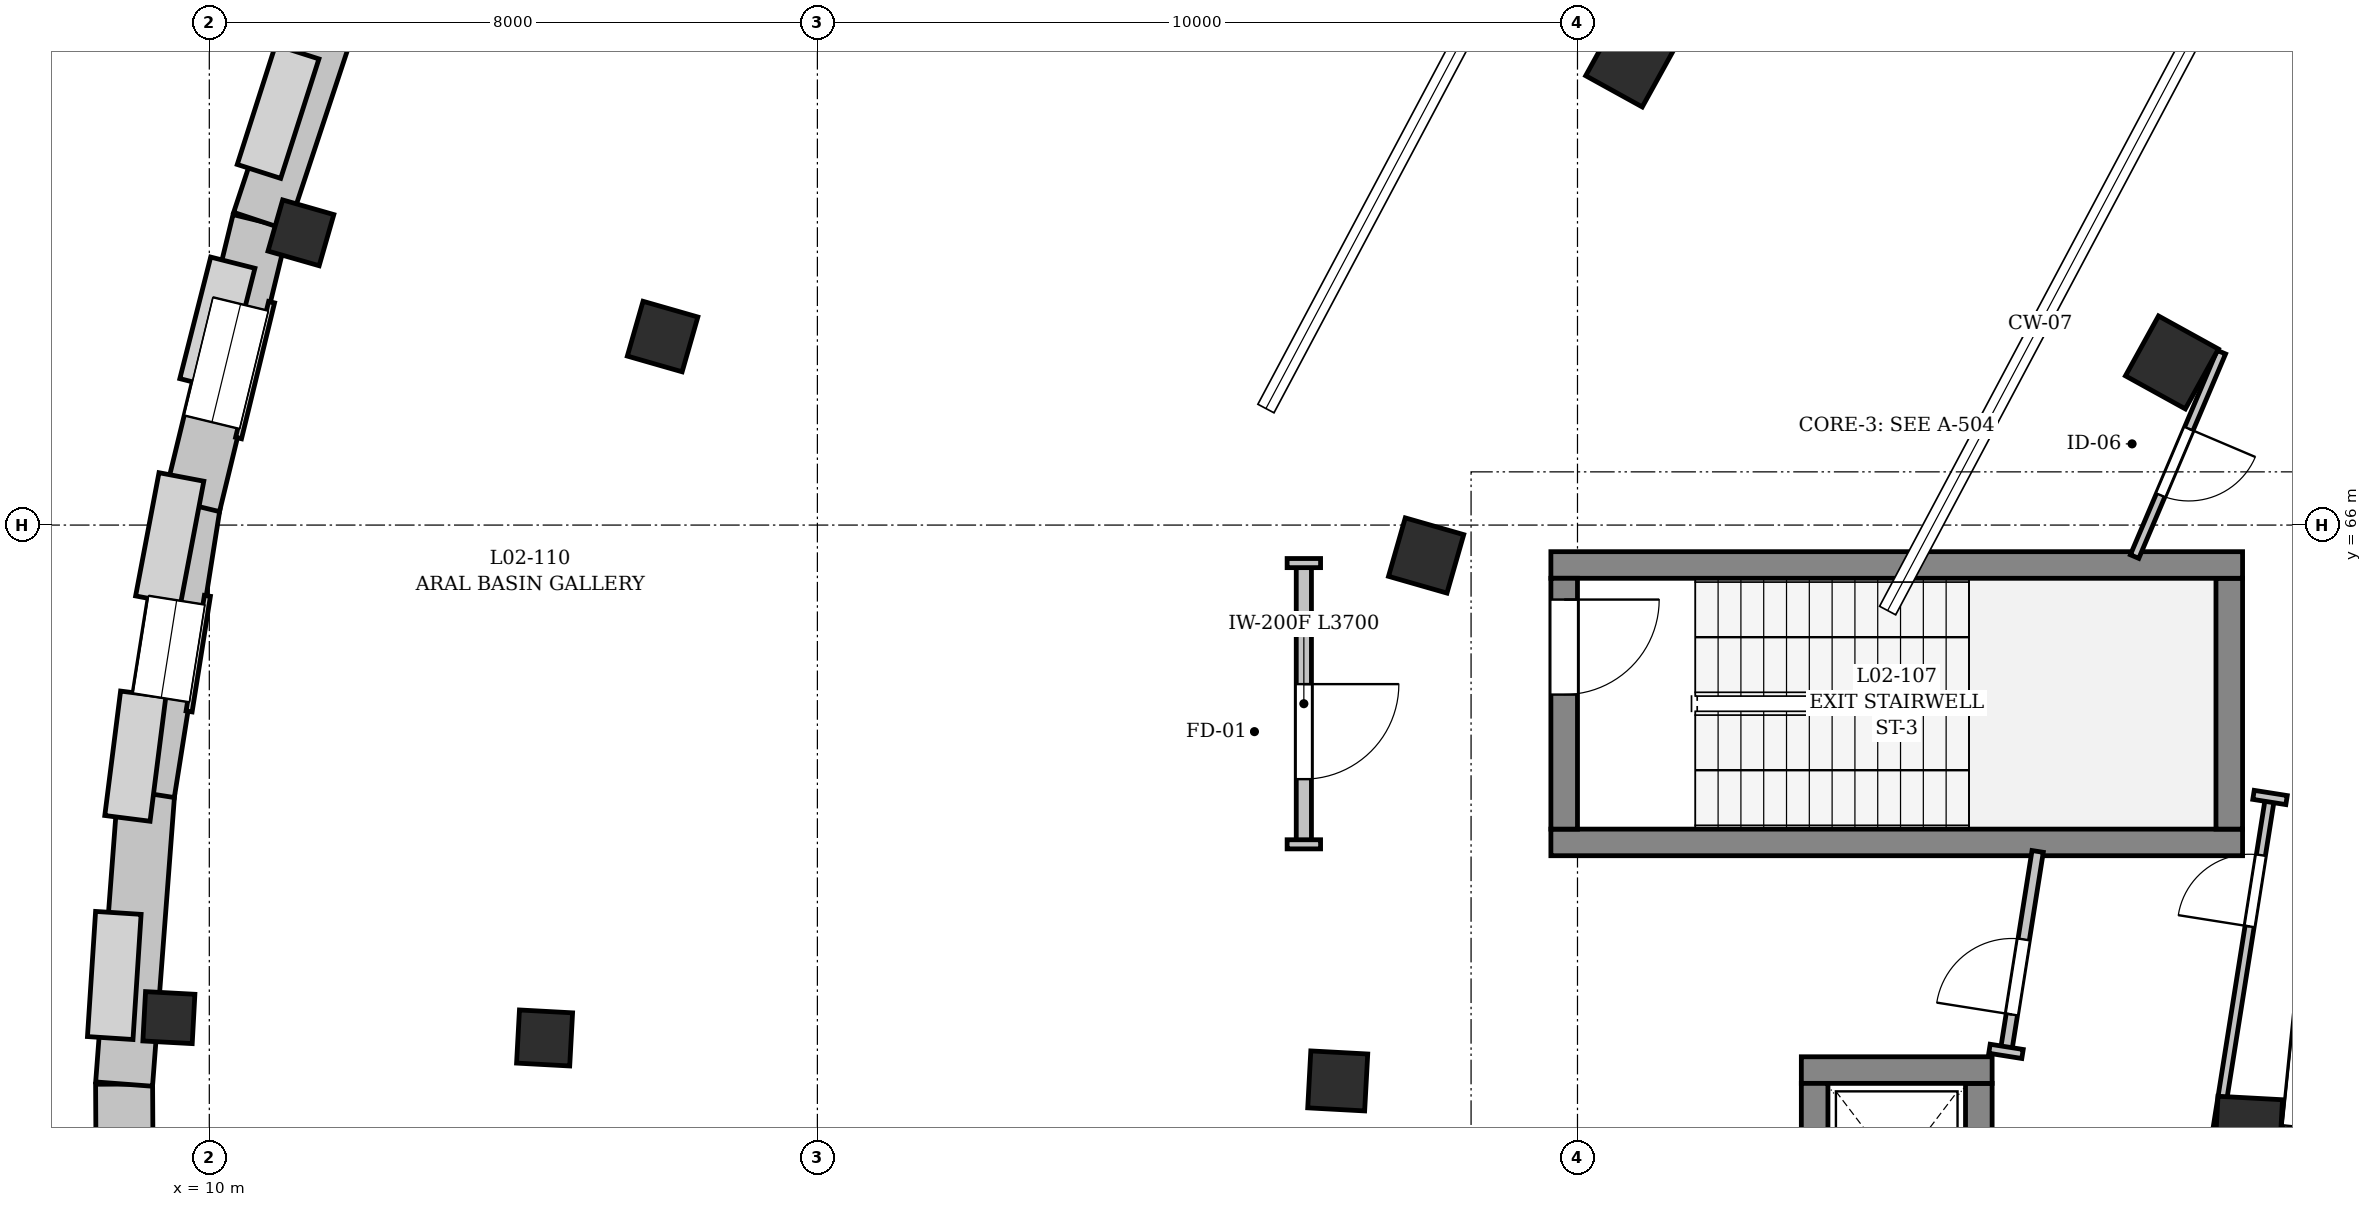
"""IFC4 building model, lengths in metres.
Left out: names, types, materials, properties, quantities, classifications, styles, units other than length and angle.
Written with IfcOpenShell. Run it as: python <this file> out.ifc"""

import sys

from ifc_helpers import new_model, si_unit, direction, frame, frame_2d, origin, origin_2d, place, context, subcontext, project, spatial, rectangle, extrude, element, fill, save


model = new_model("IFC4")
c1 = context("Model", 3, precision=1e-05, world=origin(), true_north=direction((0.0, 1.0)))
c2 = subcontext(c1, "Body", "Model", "MODEL_VIEW")
j1 = project(units=[si_unit("LENGTHUNIT", "METRE"), si_unit("PLANEANGLEUNIT", "RADIAN")], contexts=[c1])
p1 = place(None, origin())
s1 = spatial("IfcSite", under=j1, at=p1, CompositionType="ELEMENT")
p2 = place(p1, origin())
s2 = spatial("IfcBuilding", under=s1, at=p2, CompositionType="ELEMENT")
p3 = place(p2, frame((0.0, 0.0, 5.4)))
s3 = spatial("IfcBuildingStorey", under=s2, at=p3, CompositionType="ELEMENT", Elevation=5.4)
p4 = place(p3, frame((35.821, 68.14, 0.0), z_axis=(0.0, 0.0, 1.0), x_axis=(-0.875464527, 0.483282383255, 0.0)))
e1 = element("IfcColumn", 1, at=p4, inside=s3, PredefinedType="COLUMN", context=c2, shape_type="SweptSolid", body=[
    extrude(rectangle(XDim=0.9, YDim=0.9, at=origin_2d()), origin(), (0.0, 0.0, 1.0), 4.52),
])
p5 = place(p3, frame((28.686, 72.078, 0.0), z_axis=(0.0, 0.0, 1.0), x_axis=(-0.875464527, 0.483282383255, 0.0)))
e2 = element("IfcColumn", 2, at=p5, inside=s3, PredefinedType="COLUMN", context=c2, shape_type="SweptSolid", body=[
    extrude(rectangle(XDim=0.85, YDim=0.85, at=origin_2d()), origin(), (0.0, 0.0, 1.0), 4.52),
])
p6 = place(p3, frame((26.009, 65.6, 0.0), z_axis=(0.0, 0.0, 1.0), x_axis=(-0.961261695938, 0.275637355817, 0.0)))
e3 = element("IfcColumn", 3, at=p6, inside=s3, PredefinedType="COLUMN", context=c2, shape_type="SweptSolid", body=[
    extrude(rectangle(XDim=0.8, YDim=0.8, at=origin_2d()), origin(), (0.0, 0.0, 1.0), 4.52),
])
p7 = place(p3, frame((15.963, 68.48, 0.0), z_axis=(0.0, 0.0, 1.0), x_axis=(-0.961261695938, 0.275637355817, 0.0)))
e4 = element("IfcColumn", 4, at=p7, inside=s3, PredefinedType="COLUMN", context=c2, shape_type="SweptSolid", body=[
    extrude(rectangle(XDim=0.75, YDim=0.75, at=origin_2d()), origin(), (0.0, 0.0, 1.0), 4.52),
])
p8 = place(p3, frame((11.205, 69.845, 0.0), z_axis=(0.0, 0.0, 1.0), x_axis=(-0.961261695938, 0.275637355817, 0.0)))
e5 = element("IfcColumn", 5, at=p8, inside=s3, PredefinedType="COLUMN", context=c2, shape_type="SweptSolid", body=[
    extrude(rectangle(XDim=0.7, YDim=0.7, at=origin_2d()), origin(), (0.0, 0.0, 1.0), 4.52),
])
p9 = place(p3, frame((36.828, 58.038, 0.0), z_axis=(0.0, 0.0, 1.0), x_axis=(-0.998536670326, 0.054078812985, 0.0)))
e6 = element("IfcColumn", 6, at=p9, inside=s3, PredefinedType="COLUMN", context=c2, shape_type="SweptSolid", body=[
    extrude(rectangle(XDim=0.85, YDim=0.85, at=origin_2d()), origin(), (0.0, 0.0, 1.0), 4.52),
])
p10 = place(p3, frame((24.846, 58.687, 0.0), z_axis=(0.0, 0.0, 1.0), x_axis=(-0.998536670326, 0.054078812985, 0.0)))
e7 = element("IfcColumn", 7, at=p10, inside=s3, PredefinedType="COLUMN", context=c2, shape_type="SweptSolid", body=[
    extrude(rectangle(XDim=0.75, YDim=0.75, at=origin_2d()), origin(), (0.0, 0.0, 1.0), 4.52),
])
p11 = place(p3, frame((14.411, 59.252, 0.0), z_axis=(0.0, 0.0, 1.0), x_axis=(-0.998536670326, 0.054078812985, 0.0)))
e8 = element("IfcColumn", 8, at=p11, inside=s3, PredefinedType="COLUMN", context=c2, shape_type="SweptSolid", body=[
    extrude(rectangle(XDim=0.7, YDim=0.7, at=origin_2d()), origin(), (0.0, 0.0, 1.0), 4.52),
])
p12 = place(p3, frame((9.468, 59.52, 0.0), z_axis=(0.0, 0.0, 1.0), x_axis=(-0.998536670326, 0.054078812985, 0.0)))
e9 = element("IfcColumn", 9, at=p12, inside=s3, PredefinedType="COLUMN", context=c2, shape_type="SweptSolid", body=[
    extrude(rectangle(XDim=0.65, YDim=0.65, at=origin_2d()), origin(), (0.0, 0.0, 1.0), 4.52),
])
p13 = place(p3, frame((37.792, 60.649, 0.0), z_axis=(0.0, 0.0, 1.0), x_axis=(-0.101618529077, -0.994823438882, 0.0)))
e10 = element("IfcWall", 10, at=p13, inside=s3, PredefinedType="SOLIDWALL", context=c2, shape_type="SweptSolid", body=[
    extrude(rectangle(XDim=3.669, YDim=0.5, at=frame_2d((1.834, 0.0))), origin(), (0.0, 0.0, 1.0), 3.81),
])
p14 = place(p13, frame((1.084, 0.0, 0.9)))
e11 = element("IfcOpeningElement", 11, at=p14, cuts=e10, PredefinedType="OPENING", context=c2, shape_type="SweptSolid", body=[
    extrude(rectangle(XDim=1.5, YDim=2.1, at=frame_2d((0.75, 1.05))), frame((0.0, 0.26, 0.0), z_axis=(0.0, -1.0, 0.0), x_axis=(1.0, 0.0, 0.0)), (0.0, 0.0, 1.0), 0.52),
])
p15 = place(p3, frame((8.901, 54.806, 0.0), z_axis=(0.0, 0.0, 1.0), x_axis=(-0.005850456312, 0.999982885934, 0.0)))
e12 = element("IfcWall", 12, at=p15, inside=s3, PredefinedType="SOLIDWALL", context=c2, shape_type="SweptSolid", body=[
    extrude(rectangle(XDim=3.839, YDim=0.75, at=frame_2d((1.919, 0.0))), origin(), (0.0, 0.0, 1.0), 4.52),
])
p16 = place(p15, frame((1.32, 0.0, 0.75)))
e13 = element("IfcOpeningElement", 13, at=p16, cuts=e12, PredefinedType="OPENING", context=c2, shape_type="SweptSolid", body=[
    extrude(rectangle(XDim=1.2, YDim=2.2, at=frame_2d((0.6, 1.1))), frame((0.0, 0.385, 0.0), z_axis=(0.0, -1.0, 0.0), x_axis=(1.0, 0.0, 0.0)), (0.0, 0.0, 1.0), 0.77),
])
p17 = place(p3, frame((8.879, 58.646, 0.0), z_axis=(0.0, 0.0, 1.0), x_axis=(0.075612006837, 0.997137314728, 0.0)))
e14 = element("IfcWall", 14, at=p17, inside=s3, PredefinedType="SOLIDWALL", context=c2, shape_type="SweptSolid", body=[
    extrude(rectangle(XDim=3.839, YDim=0.75, at=frame_2d((1.919, 0.0))), origin(), (0.0, 0.0, 1.0), 3.11),
])
p18 = place(p3, frame((9.169, 62.474, 0.0), z_axis=(0.0, 0.0, 1.0), x_axis=(0.156432782226, 0.987688607125, 0.0)))
e15 = element("IfcWall", 15, at=p18, inside=s3, PredefinedType="SOLIDWALL", context=c2, shape_type="SweptSolid", body=[
    extrude(rectangle(XDim=3.839, YDim=0.75, at=frame_2d((1.92, 0.0))), origin(), (0.0, 0.0, 1.0), 4.52),
])
p19 = place(p18, frame((1.27, 0.0, 0.75)))
e16 = element("IfcOpeningElement", 16, at=p19, cuts=e15, PredefinedType="OPENING", context=c2, shape_type="SweptSolid", body=[
    extrude(rectangle(XDim=1.3, YDim=2.2, at=frame_2d((0.65, 1.1))), frame((0.0, 0.385, 0.0), z_axis=(0.0, -1.0, 0.0), x_axis=(1.0, 0.0, 0.0)), (0.0, 0.0, 1.0), 0.77),
])
p20 = place(p3, frame((9.77, 66.266, 0.0), z_axis=(0.0, 0.0, 1.0), x_axis=(0.236246101935, 0.971693253718, 0.0)))
e17 = element("IfcWall", 17, at=p20, inside=s3, PredefinedType="SOLIDWALL", context=c2, shape_type="SweptSolid", body=[
    extrude(rectangle(XDim=3.839, YDim=0.75, at=frame_2d((1.919, 0.0))), origin(), (0.0, 0.0, 1.0), 3.11),
])
p21 = place(p20, frame((1.12, 0.0, 0.75)))
e18 = element("IfcOpeningElement", 18, at=p21, cuts=e17, PredefinedType="OPENING", context=c2, shape_type="SweptSolid", body=[
    extrude(rectangle(XDim=1.6, YDim=1.6, at=frame_2d((0.8, 0.8))), frame((0.0, 0.385, 0.0), z_axis=(0.0, -1.0, 0.0), x_axis=(1.0, 0.0, 0.0)), (0.0, 0.0, 1.0), 0.77),
])
p22 = place(p3, frame((10.677, 69.996, 0.0), z_axis=(0.0, 0.0, 1.0), x_axis=(0.31451034976, 0.949254043918, 0.0)))
e19 = element("IfcWall", 19, at=p22, inside=s3, PredefinedType="SOLIDWALL", context=c2, shape_type="SweptSolid", body=[
    extrude(rectangle(XDim=3.839, YDim=0.75, at=frame_2d((1.92, 0.0))), origin(), (0.0, 0.0, 1.0), 3.11),
])
p23 = place(p3, frame((42.244, 70.923, 0.0), z_axis=(0.0, 0.0, 1.0), x_axis=(-0.719345409555, 0.694652561898, 0.0)))
e20 = element("IfcWall", 20, at=p23, inside=s3, PredefinedType="SOLIDWALL", context=c2, shape_type="SweptSolid", body=[
    extrude(rectangle(XDim=11.934, YDim=0.52, at=frame_2d((5.967, 0.0))), origin(), (0.0, 0.0, 1.0), 3.54),
])
p24 = place(p23, frame((4.072, 0.0, 0.9)))
e21 = element("IfcOpeningElement", 21, at=p24, cuts=e20, PredefinedType="OPENING", context=c2, shape_type="SweptSolid", body=[
    extrude(rectangle(XDim=1.75, YDim=1.85, at=frame_2d((0.875, 0.925))), frame((0.0, 0.27, 0.0), z_axis=(0.0, -1.0, 0.0), x_axis=(1.0, 0.0, 0.0)), (0.0, 0.0, 1.0), 0.54),
])
p25 = place(p23, frame((6.892, 0.0, 0.9)))
e22 = element("IfcOpeningElement", 22, at=p25, cuts=e20, PredefinedType="OPENING", context=c2, shape_type="SweptSolid", body=[
    extrude(rectangle(XDim=1.75, YDim=1.85, at=frame_2d((0.875, 0.925))), frame((0.0, 0.27, 0.0), z_axis=(0.0, -1.0, 0.0), x_axis=(1.0, 0.0, 0.0)), (0.0, 0.0, 1.0), 0.54),
])
p26 = place(p3, frame((27.65, 61.825, 0.0), z_axis=(0.0, 0.0, 1.0), x_axis=(1.0, 0.0, 0.0)))
e23 = element("IfcWall", 23, at=p26, inside=s3, PredefinedType="SHEAR", context=c2, shape_type="SweptSolid", body=[
    extrude(rectangle(XDim=9.1, YDim=0.35, at=frame_2d((4.55, 0.0))), origin(), (0.0, 0.0, 1.0), 4.52),
])
p27 = place(p3, frame((36.575, 62.0, 0.0), z_axis=(0.0, 0.0, 1.0), x_axis=(0.0, 1.0, 0.0)))
e24 = element("IfcWall", 24, at=p27, inside=s3, PredefinedType="SHEAR", context=c2, shape_type="SweptSolid", body=[
    extrude(rectangle(XDim=3.3, YDim=0.35, at=frame_2d((1.65, 0.0))), origin(), (0.0, 0.0, 1.0), 4.52),
])
p28 = place(p3, frame((36.75, 65.475, 0.0), z_axis=(0.0, 0.0, 1.0), x_axis=(-1.0, 0.0, 0.0)))
e25 = element("IfcWall", 25, at=p28, inside=s3, PredefinedType="SHEAR", context=c2, shape_type="SweptSolid", body=[
    extrude(rectangle(XDim=9.1, YDim=0.35, at=frame_2d((4.55, 0.0))), origin(), (0.0, 0.0, 1.0), 4.52),
])
p29 = place(p3, frame((27.825, 65.3, 0.0), z_axis=(0.0, 0.0, 1.0), x_axis=(0.0, -1.0, 0.0)))
e26 = element("IfcWall", 26, at=p29, inside=s3, PredefinedType="SHEAR", context=c2, shape_type="SweptSolid", body=[
    extrude(rectangle(XDim=3.3, YDim=0.35, at=frame_2d((1.65, 0.0))), origin(), (0.0, 0.0, 1.0), 4.52),
])
p30 = place(p29, frame((0.28, 0.0, 0.0)))
e27 = element("IfcOpeningElement", 27, at=p30, cuts=e26, PredefinedType="OPENING", context=c2, shape_type="SweptSolid", body=[
    extrude(rectangle(XDim=1.25, YDim=2.2, at=frame_2d((0.625, 1.1))), frame((0.0, 0.185, 0.0), z_axis=(0.0, -1.0, 0.0), x_axis=(1.0, 0.0, 0.0)), (0.0, 0.0, 1.0), 0.37),
])
p31 = place(p3, frame((33.28, 56.345, 0.0), z_axis=(0.0, 0.0, 1.0), x_axis=(0.0, 1.0, 0.0)))
e28 = element("IfcWall", 28, at=p31, inside=s3, PredefinedType="SHEAR", context=c2, shape_type="SweptSolid", body=[
    extrude(rectangle(XDim=2.31, YDim=0.35, at=frame_2d((1.155, 0.0))), origin(), (0.0, 0.0, 1.0), 4.52),
])
p32 = place(p3, frame((33.455, 58.83, 0.0), z_axis=(0.0, 0.0, 1.0), x_axis=(-1.0, 0.0, 0.0)))
e29 = element("IfcWall", 29, at=p32, inside=s3, PredefinedType="SHEAR", context=c2, shape_type="SweptSolid", body=[
    extrude(rectangle(XDim=2.51, YDim=0.35, at=frame_2d((1.255, 0.0))), origin(), (0.0, 0.0, 1.0), 4.52),
])
p33 = place(p3, frame((31.12, 58.655, 0.0), z_axis=(0.0, 0.0, 1.0), x_axis=(0.0, -1.0, 0.0)))
e30 = element("IfcWall", 30, at=p33, inside=s3, PredefinedType="SHEAR", context=c2, shape_type="SweptSolid", body=[
    extrude(rectangle(XDim=2.31, YDim=0.35, at=frame_2d((1.155, 0.0))), origin(), (0.0, 0.0, 1.0), 4.52),
])
p34 = place(p3, frame((24.4, 65.5, 0.0), z_axis=(0.0, 0.0, 1.0), x_axis=(0.0, -1.0, 0.0)))
e31 = element("IfcWall", 31, at=p34, inside=s3, PredefinedType="PARTITIONING", context=c2, shape_type="SweptSolid", body=[
    extrude(rectangle(XDim=3.7, YDim=0.2, at=frame_2d((1.85, 0.0))), origin(), (0.0, 0.0, 1.0), 4.52),
])
p35 = place(p34, frame((1.593, 0.0, 0.0)))
e32 = element("IfcOpeningElement", 32, at=p35, cuts=e31, PredefinedType="OPENING", context=c2, shape_type="SweptSolid", body=[
    extrude(rectangle(XDim=1.25, YDim=2.2, at=frame_2d((0.625, 1.1))), frame((0.0, 0.11, 0.0), z_axis=(0.0, -1.0, 0.0), x_axis=(1.0, 0.0, 0.0)), (0.0, 0.0, 1.0), 0.22),
])
p36 = place(p3, frame((36.362, 57.686, 0.0), z_axis=(0.0, 0.0, 1.0), x_axis=(0.156391852422, 0.987695088829, 0.0)))
e33 = element("IfcWall", 33, at=p36, inside=s3, PredefinedType="PARTITIONING", context=c2, shape_type="SweptSolid", body=[
    extrude(rectangle(XDim=4.789, YDim=0.12, at=frame_2d((2.395, 0.0))), origin(), (0.0, 0.0, 1.0), 3.61),
])
p37 = place(p36, frame((3.072, 0.0, 0.0)))
e34 = element("IfcOpeningElement", 34, at=p37, cuts=e33, PredefinedType="OPENING", context=c2, shape_type="SweptSolid", body=[
    extrude(rectangle(XDim=0.95, YDim=2.2, at=frame_2d((0.475, 1.1))), frame((0.0, 0.07, 0.0), z_axis=(0.0, -1.0, 0.0), x_axis=(1.0, 0.0, 0.0)), (0.0, 0.0, 1.0), 0.14),
])
p38 = place(p3, frame((36.471, 68.275, 0.0), z_axis=(0.0, 0.0, 1.0), x_axis=(-0.39080089657, -0.920475235539, 0.0)))
e35 = element("IfcWall", 35, at=p38, inside=s3, PredefinedType="PARTITIONING", context=c2, shape_type="SweptSolid", body=[
    extrude(rectangle(XDim=2.922, YDim=0.12, at=frame_2d((1.461, 0.0))), origin(), (0.0, 0.0, 1.0), 3.51),
])
p39 = place(p38, frame((1.095, 0.0, 0.0)))
e36 = element("IfcOpeningElement", 36, at=p39, cuts=e35, PredefinedType="OPENING", context=c2, shape_type="SweptSolid", body=[
    extrude(rectangle(XDim=0.95, YDim=2.2, at=frame_2d((0.475, 1.1))), frame((0.0, 0.07, 0.0), z_axis=(0.0, -1.0, 0.0), x_axis=(1.0, 0.0, 0.0)), (0.0, 0.0, 1.0), 0.14),
])
p40 = place(p3, frame((33.637, 59.076, 0.0), z_axis=(0.0, 0.0, 1.0), x_axis=(0.156485085327, 0.9876803218, 0.0)))
e37 = element("IfcWall", 37, at=p40, inside=s3, PredefinedType="PARTITIONING", context=c2, shape_type="SweptSolid", body=[
    extrude(rectangle(XDim=2.663, YDim=0.15, at=frame_2d((1.332, 0.0))), origin(), (0.0, 0.0, 1.0), 4.52),
])
p41 = place(p40, frame((0.491, 0.0, 0.0)))
e38 = element("IfcOpeningElement", 38, at=p41, cuts=e37, PredefinedType="OPENING", context=c2, shape_type="SweptSolid", body=[
    extrude(rectangle(XDim=1.0, YDim=2.2, at=frame_2d((0.5, 1.1))), frame((0.0, 0.085, 0.0), z_axis=(0.0, -1.0, 0.0), x_axis=(1.0, 0.0, 0.0)), (0.0, 0.0, 1.0), 0.17),
])
for number, where, z_axis, x_axis in (
    (39, (24.18, 65.5, 0.0), (0.0, 0.0, 1.0), (1.0, 0.0, 0.0)),
    (40, (24.18, 61.8, 0.0), (0.0, 0.0, 1.0), (1.0, 0.0, 0.0)),
    (41, (37.329, 62.382, 0.0), (0.0, 0.0, 1.0), (-0.988, 0.156, 0.0)),
):
    element("IfcWall", number, at=place(p3, frame(where, z_axis=z_axis, x_axis=x_axis)), inside=s3, PredefinedType="PARTITIONING", context=c2, shape_type="SweptSolid", body=[
        extrude(rectangle(XDim=0.44, YDim=0.12, at=frame_2d((0.22, 0.0))), origin(), (0.0, 0.0, 1.0), 4.52),
    ])
p42 = place(p3, frame((33.855, 59.042, 0.0), z_axis=(0.0, 0.0, 1.0), x_axis=(-0.98768185006, 0.156475439167, 0.0)))
e42 = element("IfcWall", 42, at=p42, inside=s3, PredefinedType="PARTITIONING", context=c2, shape_type="SweptSolid", body=[
    extrude(rectangle(XDim=0.44, YDim=0.12, at=frame_2d((0.22, 0.0))), origin(), (0.0, 0.0, 1.0), 4.52),
])
p43 = place(p19, origin())
e43 = element("IfcWindow", 43, at=p43, inside=s3, PartitioningType="DOUBLE_PANEL_VERTICAL", PredefinedType="WINDOW", context=c2, shape_type="SweptSolid", body=[
    extrude(rectangle(XDim=1.3, YDim=2.2, at=frame_2d((0.65, 1.1))), frame((0.0, 0.03, 0.0), z_axis=(0.0, -1.0, 0.0), x_axis=(1.0, 0.0, 0.0)), (0.0, 0.0, 1.0), 0.06),
])
fill(e16, e43)
p44 = place(p21, origin())
e44 = element("IfcWindow", 44, at=p44, inside=s3, PartitioningType="DOUBLE_PANEL_VERTICAL", PredefinedType="WINDOW", context=c2, shape_type="SweptSolid", body=[
    extrude(rectangle(XDim=1.6, YDim=1.6, at=frame_2d((0.8, 0.8))), frame((0.0, 0.03, 0.0), z_axis=(0.0, -1.0, 0.0), x_axis=(1.0, 0.0, 0.0)), (0.0, 0.0, 1.0), 0.06),
])
fill(e18, e44)
p45 = place(p30, origin())
e45 = element("IfcDoor", 45, at=p45, inside=s3, OperationType="SINGLE_SWING_LEFT", PredefinedType="DOOR", context=c2, shape_type="SweptSolid", body=[
    extrude(rectangle(XDim=1.25, YDim=2.2, at=frame_2d((0.625, 1.1))), frame((0.0, 0.025, 0.0), z_axis=(0.0, -1.0, 0.0), x_axis=(1.0, 0.0, 0.0)), (0.0, 0.0, 1.0), 0.05),
])
fill(e27, e45)
p46 = place(p35, origin())
e46 = element("IfcDoor", 46, at=p46, inside=s3, OperationType="SINGLE_SWING_LEFT", PredefinedType="DOOR", context=c2, shape_type="SweptSolid", body=[
    extrude(rectangle(XDim=1.25, YDim=2.2, at=frame_2d((0.625, 1.1))), frame((0.0, 0.025, 0.0), z_axis=(0.0, -1.0, 0.0), x_axis=(1.0, 0.0, 0.0)), (0.0, 0.0, 1.0), 0.05),
])
fill(e32, e46)
p47 = place(p37, origin())
e47 = element("IfcDoor", 47, at=p47, inside=s3, OperationType="SINGLE_SWING_LEFT", PredefinedType="DOOR", context=c2, shape_type="SweptSolid", body=[
    extrude(rectangle(XDim=0.95, YDim=2.2, at=frame_2d((0.475, 1.1))), frame((0.0, 0.025, 0.0), z_axis=(0.0, -1.0, 0.0), x_axis=(1.0, 0.0, 0.0)), (0.0, 0.0, 1.0), 0.05),
])
fill(e34, e47)
p48 = place(p41, origin())
e48 = element("IfcDoor", 48, at=p48, inside=s3, OperationType="SINGLE_SWING_RIGHT", PredefinedType="DOOR", context=c2, shape_type="SweptSolid", body=[
    extrude(rectangle(XDim=1.0, YDim=2.2, at=frame_2d((0.5, 1.1))), frame((0.0, 0.025, 0.0), z_axis=(0.0, -1.0, 0.0), x_axis=(1.0, 0.0, 0.0)), (0.0, 0.0, 1.0), 0.05),
])
fill(e38, e48)
p49 = place(p39, origin())
e49 = element("IfcDoor", 49, at=p49, inside=s3, OperationType="SINGLE_SWING_LEFT", PredefinedType="DOOR", context=c2, shape_type="SweptSolid", body=[
    extrude(rectangle(XDim=0.95, YDim=2.2, at=frame_2d((0.475, 1.1))), frame((0.0, 0.025, 0.0), z_axis=(0.0, -1.0, 0.0), x_axis=(1.0, 0.0, 0.0)), (0.0, 0.0, 1.0), 0.05),
])
fill(e36, e49)
save(model, sys.argv[1])
